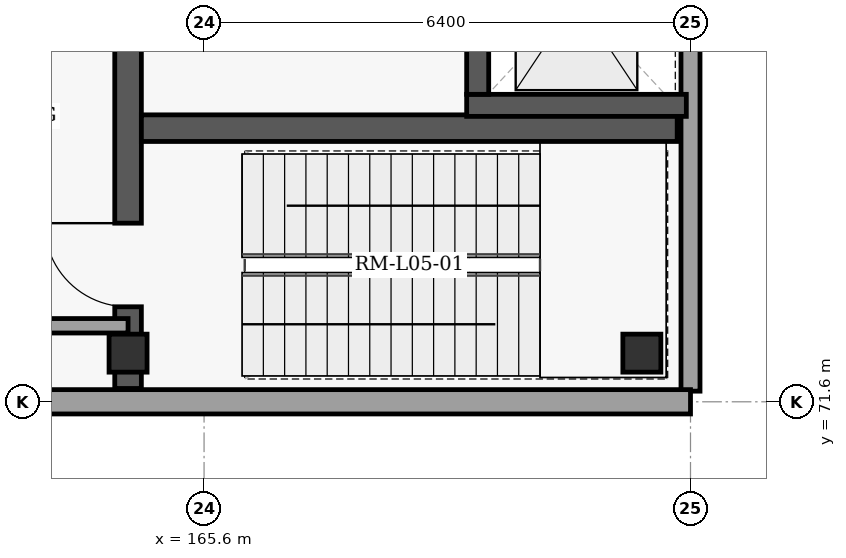
"""IFC4 building model, lengths in metres.
Left out: names, types, materials, properties, quantities, classifications, styles, units other than length and angle.
Written with IfcOpenShell. Run it as: python <this file> out.ifc"""

import sys

from ifc_helpers import new_model, si_unit, direction, frame, frame_2d, origin, origin_2d, place, context, subcontext, project, spatial, rectangle, extrude, element, fill, save


model = new_model("IFC4")
c1 = context("Model", 3, precision=1e-05, world=origin(), true_north=direction((0.0, 1.0)))
c2 = subcontext(c1, "Body", "Model", "MODEL_VIEW")
j1 = project(units=[si_unit("LENGTHUNIT", "METRE"), si_unit("PLANEANGLEUNIT", "RADIAN")], contexts=[c1])
p1 = place(None, origin())
s1 = spatial("IfcSite", under=j1, at=p1, CompositionType="ELEMENT")
p2 = place(p1, origin())
s2 = spatial("IfcBuilding", under=s1, at=p2, CompositionType="ELEMENT")
p3 = place(p2, frame((0.0, 0.0, 24.9)))
s3 = spatial("IfcBuildingStorey", under=s2, at=p3, CompositionType="ELEMENT", Elevation=24.9)
for number, where, z_axis, x_axis in (
    (1, (164.6, 72.24, 0.0), (0.0, 0.0, 1.0), (1.0, 0.0, 0.0)),
    (2, (171.36, 72.24, 0.0), (0.0, 0.0, 1.0), (1.0, 0.0, 0.0)),
):
    element("IfcColumn", number, at=place(p3, frame(where, z_axis=z_axis, x_axis=x_axis)), inside=s3, PredefinedType="COLUMN", context=c2, shape_type="SweptSolid", body=[
        extrude(rectangle(XDim=0.5, YDim=0.5, at=origin_2d()), origin(), (0.0, 0.0, 1.0), 4.5),
    ])
p4 = place(p3, frame((172.0, 117.86, 0.0), z_axis=(0.0, 0.0, 1.0), x_axis=(0.0, -1.0, 0.0)))
e3 = element("IfcWall", 3, at=p4, inside=s3, PredefinedType="SOLIDWALL", context=c2, shape_type="SweptSolid", body=[
    extrude(rectangle(XDim=46.12, YDim=0.25, at=frame_2d((23.06, 0.0))), origin(), (0.0, 0.0, 1.0), 4.3),
])
p5 = place(p3, frame((172.0, 71.6, 0.0), z_axis=(0.0, 0.0, 1.0), x_axis=(-1.0, 0.0, 0.0)))
e4 = element("IfcWall", 4, at=p5, inside=s3, PredefinedType="SOLIDWALL", context=c2, shape_type="SweptSolid", body=[
    extrude(rectangle(XDim=19.2, YDim=0.32, at=frame_2d((9.6, 0.0))), origin(), (0.0, 0.0, 1.0), 4.3),
])
p6 = place(p5, frame((10.0, 0.0, 0.8)))
e5 = element("IfcOpeningElement", 5, at=p6, cuts=e4, PredefinedType="OPENING", context=c2, shape_type="SweptSolid", body=[
    extrude(rectangle(XDim=2.45, YDim=2.8, at=frame_2d((1.225, 1.4))), frame((0.0, 0.17, 0.0), z_axis=(0.0, -1.0, 0.0), x_axis=(1.0, 0.0, 0.0)), (0.0, 0.0, 1.0), 0.34),
])
p7 = place(p3, frame((164.6, 71.775, 0.0), z_axis=(0.0, 0.0, 1.0), x_axis=(0.0, 1.0, 0.0)))
e6 = element("IfcWall", 6, at=p7, inside=s3, PredefinedType="SHEAR", context=c2, shape_type="SweptSolid", body=[
    extrude(rectangle(XDim=7.573, YDim=0.35, at=frame_2d((3.787, 0.0))), origin(), (0.0, 0.0, 1.0), 4.3),
])
p8 = place(p7, frame((1.075, 0.0, 0.0)))
e7 = element("IfcOpeningElement", 7, at=p8, cuts=e6, PredefinedType="OPENING", context=c2, shape_type="SweptSolid", body=[
    extrude(rectangle(XDim=1.1, YDim=2.15, at=frame_2d((0.55, 1.075))), frame((0.0, 0.185, 0.0), z_axis=(0.0, -1.0, 0.0), x_axis=(1.0, 0.0, 0.0)), (0.0, 0.0, 1.0), 0.37),
])
p9 = place(p7, frame((5.05, 0.0, 0.0)))
e8 = element("IfcOpeningElement", 8, at=p9, cuts=e6, PredefinedType="OPENING", context=c2, shape_type="SweptSolid", body=[
    extrude(rectangle(XDim=1.15, YDim=2.2, at=frame_2d((0.575, 1.1))), frame((0.0, 0.185, 0.0), z_axis=(0.0, -1.0, 0.0), x_axis=(1.0, 0.0, 0.0)), (0.0, 0.0, 1.0), 0.37),
])
p10 = place(p3, frame((164.775, 75.2, 0.0), z_axis=(0.0, 0.0, 1.0), x_axis=(1.0, 0.0, 0.0)))
e9 = element("IfcWall", 9, at=p10, inside=s3, PredefinedType="SHEAR", context=c2, shape_type="SweptSolid", body=[
    extrude(rectangle(XDim=7.05, YDim=0.35, at=frame_2d((3.525, 0.0))), origin(), (0.0, 0.0, 1.0), 4.3),
])
p11 = place(p3, frame((169.055, 75.5, 0.0), z_axis=(0.0, 0.0, 1.0), x_axis=(1.0, 0.0, 0.0)))
e10 = element("IfcWall", 10, at=p11, inside=s3, PredefinedType="SHEAR", context=c2, shape_type="SweptSolid", body=[
    extrude(rectangle(XDim=2.89, YDim=0.29, at=frame_2d((1.445, 0.0))), origin(), (0.0, 0.0, 1.0), 4.3),
])
p12 = place(p3, frame((169.2, 75.645, 0.0), z_axis=(0.0, 0.0, 1.0), x_axis=(0.0, 1.0, 0.0)))
e11 = element("IfcWall", 11, at=p12, inside=s3, PredefinedType="SHEAR", context=c2, shape_type="SweptSolid", body=[
    extrude(rectangle(XDim=2.51, YDim=0.29, at=frame_2d((1.255, 0.0))), origin(), (0.0, 0.0, 1.0), 4.3),
])
p13 = place(p12, frame((0.705, 0.0, 0.0)))
e12 = element("IfcOpeningElement", 12, at=p13, cuts=e11, PredefinedType="OPENING", context=c2, shape_type="SweptSolid", body=[
    extrude(rectangle(XDim=1.1, YDim=2.15, at=frame_2d((0.55, 1.075))), frame((0.0, 0.155, 0.0), z_axis=(0.0, -1.0, 0.0), x_axis=(1.0, 0.0, 0.0)), (0.0, 0.0, 1.0), 0.31),
])
p14 = place(p3, frame((160.105, 72.6, 0.0), z_axis=(0.0, 0.0, 1.0), x_axis=(1.0, 0.0, 0.0)))
e13 = element("IfcWall", 13, at=p14, inside=s3, PredefinedType="PARTITIONING", context=c2, shape_type="SweptSolid", body=[
    extrude(rectangle(XDim=4.495, YDim=0.19, at=frame_2d((2.248, 0.0))), origin(), (0.0, 0.0, 1.0), 3.65),
])
p15 = place(p8, origin())
e14 = element("IfcDoor", 14, at=p15, inside=s3, OperationType="SINGLE_SWING_RIGHT", PredefinedType="DOOR", context=c2, shape_type="SweptSolid", body=[
    extrude(rectangle(XDim=1.1, YDim=2.15, at=frame_2d((0.55, 1.075))), frame((0.0, 0.025, 0.0), z_axis=(0.0, -1.0, 0.0), x_axis=(1.0, 0.0, 0.0)), (0.0, 0.0, 1.0), 0.05),
])
fill(e7, e14)
save(model, sys.argv[1])
